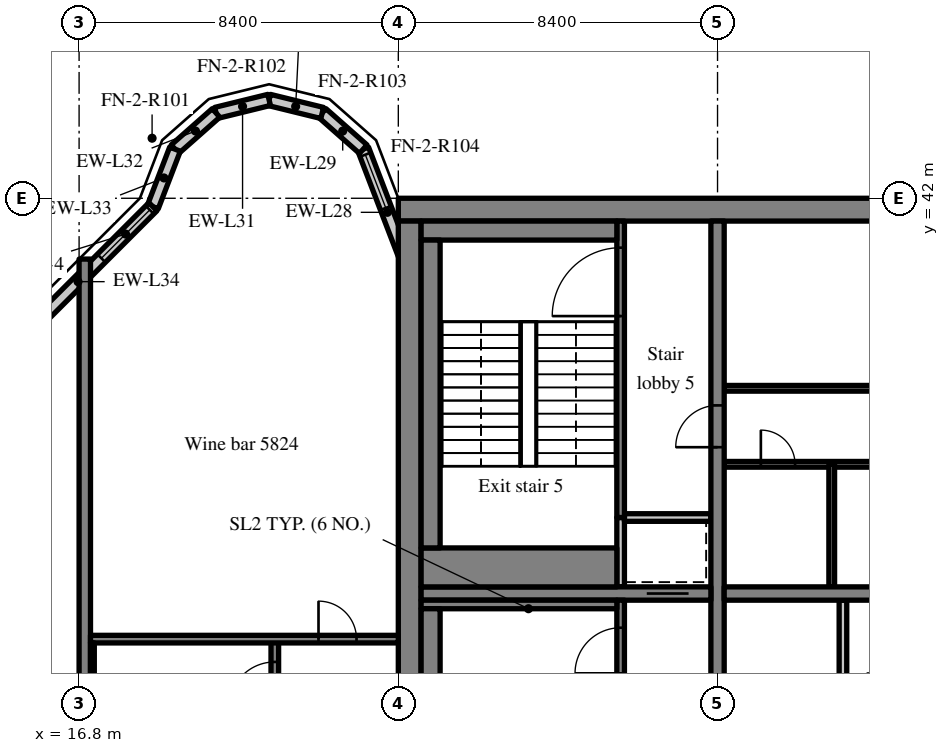
"""IFC4 building model, lengths in metres.
Left out: names, types, materials, properties, quantities, classifications, styles, units other than length and angle.
Written with IfcOpenShell. Run it as: python <this file> out.ifc"""

import sys

from ifc_helpers import new_model, si_unit, direction, frame, frame_2d, origin, place, context, subcontext, project, spatial, rectangle, extrude, source, transform, mapped, element, fill, save


model = new_model("IFC4")
c1 = context("Model", 3, precision=1e-05, world=origin(), true_north=direction((0.0, 1.0)))
c2 = subcontext(c1, "Body", "Model", "MODEL_VIEW")
j1 = project(units=[si_unit("LENGTHUNIT", "METRE"), si_unit("PLANEANGLEUNIT", "RADIAN")], contexts=[c1])
p1 = place(None, origin())
s1 = spatial("IfcSite", under=j1, at=p1, CompositionType="ELEMENT")
p2 = place(p1, origin())
s2 = spatial("IfcBuilding", under=s1, at=p2, CompositionType="ELEMENT")
p3 = place(p2, frame((0.0, 0.0, 241.3)))
s3 = spatial("IfcBuildingStorey", under=s2, at=p3, CompositionType="ELEMENT", Elevation=241.3)
m1 = source(origin(), c2, "Body", "SweptSolid", [
    extrude(rectangle(XDim=50.4, YDim=0.6, at=frame_2d((25.2, 0.0))), origin(), (0.0, 0.0, 1.0), 3.62),
])
p4 = place(p3, frame((25.2, 41.7, 0.0), z_axis=(0.0, 0.0, 1.0), x_axis=(1.0, 0.0, 0.0)))
e1 = element("IfcWall", 1, at=p4, inside=s3, PredefinedType="SHEAR", context=c2, shape_type="MappedRepresentation", body=[
    mapped(m1, transform((0.0, 0.0, 0.0), scale=1.0)),
])
m2 = source(origin(), c2, "Body", "SweptSolid", [
    extrude(rectangle(XDim=18.8, YDim=0.6, at=frame_2d((9.4, 0.0))), origin(), (0.0, 0.0, 1.0), 3.62),
])
p5 = place(p3, frame((25.5, 22.6, 0.0), z_axis=(0.0, 0.0, 1.0), x_axis=(0.0, 1.0, 0.0)))
e2 = element("IfcWall", 2, at=p5, inside=s3, PredefinedType="SHEAR", context=c2, shape_type="MappedRepresentation", body=[
    mapped(m2, transform((0.0, 0.0, 0.0), scale=1.0)),
])
m3 = source(origin(), c2, "Body", "SweptSolid", [
    extrude(rectangle(XDim=18.8, YDim=0.35, at=frame_2d((9.4, 0.0))), origin(), (0.0, 0.0, 1.0), 3.62),
])
p6 = place(p3, frame((33.6, 22.6, 0.0), z_axis=(0.0, 0.0, 1.0), x_axis=(0.0, 1.0, 0.0)))
e3 = element("IfcWall", 3, at=p6, inside=s3, PredefinedType="SHEAR", context=c2, shape_type="MappedRepresentation", body=[
    mapped(m3, transform((0.0, 0.0, 0.0), scale=1.0)),
])
m4 = source(origin(), c2, "Body", "SweptSolid", [
    extrude(rectangle(XDim=1.1, YDim=2.1, at=frame_2d((0.55, 1.05))), frame((0.0, 0.185, 0.0), z_axis=(0.0, -1.0, 0.0), x_axis=(1.0, 0.0, 0.0)), (0.0, 0.0, 1.0), 0.37),
])
p7 = place(p6, frame((12.85, 0.0, 0.0)))
e4 = element("IfcOpeningElement", 4, at=p7, cuts=e3, PredefinedType="OPENING", context=c2, shape_type="MappedRepresentation", body=[
    mapped(m4, transform((0.0, 0.0, 0.0), scale=1.0)),
])
m5 = source(origin(), c2, "Body", "SweptSolid", [
    extrude(rectangle(XDim=7.625, YDim=0.35, at=frame_2d((3.812, 0.0))), origin(), (0.0, 0.0, 1.0), 3.62),
])
p8 = place(p3, frame((25.8, 31.6, 0.0), z_axis=(0.0, 0.0, 1.0), x_axis=(1.0, 0.0, 0.0)))
e5 = element("IfcWall", 5, at=p8, inside=s3, PredefinedType="SHEAR", context=c2, shape_type="MappedRepresentation", body=[
    mapped(m5, transform((0.0, 0.0, 0.0), scale=1.0)),
])
p9 = place(p8, frame((5.938, 0.0, 0.0)))
e6 = element("IfcOpeningElement", 6, at=p9, cuts=e5, PredefinedType="OPENING", context=c2, shape_type="MappedRepresentation", body=[
    mapped(m4, transform((0.0, 0.0, 0.0), scale=1.0)),
])
m6 = source(origin(), c2, "Body", "SweptSolid", [
    extrude(rectangle(XDim=16.45, YDim=0.35, at=frame_2d((8.225, 0.0))), origin(), (0.0, 0.0, 1.0), 3.62),
])
p10 = place(p3, frame((33.775, 31.6, 0.0), z_axis=(0.0, 0.0, 1.0), x_axis=(1.0, 0.0, 0.0)))
e7 = element("IfcWall", 7, at=p10, inside=s3, PredefinedType="SHEAR", context=c2, shape_type="MappedRepresentation", body=[
    mapped(m6, transform((0.0, 0.0, 0.0), scale=1.0)),
])
m7 = source(origin(), c2, "Body", "SweptSolid", [
    extrude(rectangle(XDim=1.0, YDim=2.1, at=frame_2d((0.5, 1.05))), frame((0.0, 0.185, 0.0), z_axis=(0.0, -1.0, 0.0), x_axis=(1.0, 0.0, 0.0)), (0.0, 0.0, 1.0), 0.37),
])
p11 = place(p10, frame((14.837, 0.0, 0.0)))
e8 = element("IfcOpeningElement", 8, at=p11, cuts=e7, PredefinedType="OPENING", context=c2, shape_type="MappedRepresentation", body=[
    mapped(m7, transform((0.0, 0.0, 0.0), scale=1.0)),
])
m8 = source(origin(), c2, "Body", "SweptSolid", [
    extrude(rectangle(XDim=18.4, YDim=0.3, at=frame_2d((9.2, 0.0))), origin(), (0.0, 0.0, 1.0), 3.62),
])
p12 = place(p3, frame((16.95, 22.0, 0.0), z_axis=(0.0, 0.0, 1.0), x_axis=(0.0, 1.0, 0.0)))
e9 = element("IfcWall", 9, at=p12, inside=s3, PredefinedType="SHEAR", context=c2, shape_type="MappedRepresentation", body=[
    mapped(m8, transform((0.0, 0.0, 0.0), scale=1.0)),
])
m9 = source(origin(), c2, "Body", "SweptSolid", [
    extrude(rectangle(XDim=3.559, YDim=0.3, at=frame_2d((1.78, 0.0))), origin(), (0.0, 0.0, 1.0), 3.62),
])
p13 = place(p3, frame((25.55, 39.969, 0.0), z_axis=(0.0, 0.0, 1.0), x_axis=(-0.35779745313, 0.933799219604, 0.0)))
e10 = element("IfcWall", 10, at=p13, inside=s3, PredefinedType="SOLIDWALL", context=c2, shape_type="MappedRepresentation", body=[
    mapped(m9, transform((0.0, 0.0, 0.0), scale=1.0)),
])
m10 = source(origin(), c2, "Body", "SweptSolid", [
    extrude(rectangle(XDim=1.5, YDim=2.0, at=frame_2d((0.75, 1.0))), frame((0.0, 0.16, 0.0), z_axis=(0.0, -1.0, 0.0), x_axis=(1.0, 0.0, 0.0)), (0.0, 0.0, 1.0), 0.32),
])
p14 = place(p13, frame((1.903, 0.0, 0.9)))
e11 = element("IfcOpeningElement", 11, at=p14, cuts=e10, PredefinedType="OPENING", context=c2, shape_type="MappedRepresentation", body=[
    mapped(m10, transform((0.0, 0.0, 0.0), scale=1.0)),
])
m11 = source(origin(), c2, "Body", "SweptSolid", [
    extrude(rectangle(XDim=1.44, YDim=0.3, at=frame_2d((0.72, 0.0))), origin(), (0.0, 0.0, 1.0), 3.62),
])
p15 = place(p3, frame((24.277, 43.292, 0.0), z_axis=(0.0, 0.0, 1.0), x_axis=(-0.749649827867, 0.661834673902, 0.0)))
e12 = element("IfcWall", 12, at=p15, inside=s3, PredefinedType="SOLIDWALL", context=c2, shape_type="MappedRepresentation", body=[
    mapped(m11, transform((0.0, 0.0, 0.0), scale=1.0)),
])
m12 = source(origin(), c2, "Body", "SweptSolid", [
    extrude(rectangle(XDim=1.438, YDim=0.3, at=frame_2d((0.719, 0.0))), origin(), (0.0, 0.0, 1.0), 3.62),
])
p16 = place(p3, frame((23.197, 44.245, 0.0), z_axis=(0.0, 0.0, 1.0), x_axis=(-0.971152283879, 0.238460146601, 0.0)))
e13 = element("IfcWall", 13, at=p16, inside=s3, PredefinedType="SOLIDWALL", context=c2, shape_type="MappedRepresentation", body=[
    mapped(m12, transform((0.0, 0.0, 0.0), scale=1.0)),
])
m13 = source(origin(), c2, "Body", "SweptSolid", [
    extrude(rectangle(XDim=1.439, YDim=0.3, at=frame_2d((0.719, 0.0))), origin(), (0.0, 0.0, 1.0), 3.62),
])
p17 = place(p3, frame((21.8, 44.588, 0.0), z_axis=(0.0, 0.0, 1.0), x_axis=(-0.971161932466, -0.238420848351, 0.0)))
e14 = element("IfcWall", 14, at=p17, inside=s3, PredefinedType="SOLIDWALL", context=c2, shape_type="MappedRepresentation", body=[
    mapped(m13, transform((0.0, 0.0, 0.0), scale=1.0)),
])
m14 = source(origin(), c2, "Body", "SweptSolid", [
    extrude(rectangle(XDim=1.44, YDim=0.3, at=frame_2d((0.72, 0.0))), origin(), (0.0, 0.0, 1.0), 3.62),
])
p18 = place(p3, frame((20.403, 44.245, 0.0), z_axis=(0.0, 0.0, 1.0), x_axis=(-0.74957555648, -0.661918790432, 0.0)))
e15 = element("IfcWall", 15, at=p18, inside=s3, PredefinedType="SOLIDWALL", context=c2, shape_type="MappedRepresentation", body=[
    mapped(m14, transform((0.0, 0.0, 0.0), scale=1.0)),
])
m15 = source(origin(), c2, "Body", "SweptSolid", [
    extrude(rectangle(XDim=1.622, YDim=0.3, at=frame_2d((0.811, 0.0))), origin(), (0.0, 0.0, 1.0), 3.62),
])
p19 = place(p3, frame((19.323, 43.292, 0.0), z_axis=(0.0, 0.0, 1.0), x_axis=(-0.357778527068, -0.933806471154, 0.0)))
e16 = element("IfcWall", 16, at=p19, inside=s3, PredefinedType="SOLIDWALL", context=c2, shape_type="MappedRepresentation", body=[
    mapped(m15, transform((0.0, 0.0, 0.0), scale=1.0)),
])
m16 = source(origin(), c2, "Body", "SweptSolid", [
    extrude(rectangle(XDim=5.576, YDim=0.3, at=frame_2d((2.788, 0.0))), origin(), (0.0, 0.0, 1.0), 3.62),
])
p20 = place(p3, frame((18.743, 41.777, 0.0), z_axis=(0.0, 0.0, 1.0), x_axis=(-0.707106781187, -0.707106781187, 0.0)))
e17 = element("IfcWall", 17, at=p20, inside=s3, PredefinedType="SOLIDWALL", context=c2, shape_type="MappedRepresentation", body=[
    mapped(m16, transform((0.0, 0.0, 0.0), scale=1.0)),
])
m17 = source(origin(), c2, "Body", "SweptSolid", [
    extrude(rectangle(XDim=1.8, YDim=1.5, at=frame_2d((0.9, 0.75))), frame((0.0, 0.16, 0.0), z_axis=(0.0, -1.0, 0.0), x_axis=(1.0, 0.0, 0.0)), (0.0, 0.0, 1.0), 0.32),
])
p21 = place(p20, frame((0.118, 0.0, 0.9)))
e18 = element("IfcOpeningElement", 18, at=p21, cuts=e17, PredefinedType="OPENING", context=c2, shape_type="MappedRepresentation", body=[
    mapped(m17, transform((0.0, 0.0, 0.0), scale=1.0)),
])
m18 = source(origin(), c2, "Body", "SweptSolid", [
    extrude(rectangle(XDim=8.825, YDim=0.2, at=frame_2d((4.413, 0.0))), origin(), (0.0, 0.0, 1.0), 3.62),
])
p22 = place(p3, frame((36.9, 22.6, 0.0), z_axis=(0.0, 0.0, 1.0), x_axis=(0.0, 1.0, 0.0)))
e19 = element("IfcWall", 19, at=p22, inside=s3, PredefinedType="PARTITIONING", context=c2, shape_type="MappedRepresentation", body=[
    mapped(m18, transform((0.0, 0.0, 0.0), scale=1.0)),
])
m19 = source(origin(), c2, "Body", "SweptSolid", [
    extrude(rectangle(XDim=14.225, YDim=0.15, at=frame_2d((7.113, 0.0))), origin(), (0.0, 0.0, 1.0), 3.62),
])
p23 = place(p3, frame((33.775, 35.0, 0.0), z_axis=(0.0, 0.0, 1.0), x_axis=(1.0, 0.0, 0.0)))
e20 = element("IfcWall", 20, at=p23, inside=s3, PredefinedType="PARTITIONING", context=c2, shape_type="MappedRepresentation", body=[
    mapped(m19, transform((0.0, 0.0, 0.0), scale=1.0)),
])
m20 = source(origin(), c2, "Body", "SweptSolid", [
    extrude(rectangle(XDim=0.9, YDim=2.1, at=frame_2d((0.45, 1.05))), frame((0.0, 0.085, 0.0), z_axis=(0.0, -1.0, 0.0), x_axis=(1.0, 0.0, 0.0)), (0.0, 0.0, 1.0), 0.17),
])
p24 = place(p23, frame((0.965, 0.0, 0.0)))
e21 = element("IfcOpeningElement", 21, at=p24, cuts=e20, PredefinedType="OPENING", context=c2, shape_type="MappedRepresentation", body=[
    mapped(m20, transform((0.0, 0.0, 0.0), scale=1.0)),
])
p25 = place(p23, frame((5.917, 0.0, 0.0)))
e22 = element("IfcOpeningElement", 22, at=p25, cuts=e20, PredefinedType="OPENING", context=c2, shape_type="MappedRepresentation", body=[
    mapped(m20, transform((0.0, 0.0, 0.0), scale=1.0)),
])
p26 = place(p23, frame((11.577, 0.0, 0.0)))
e23 = element("IfcOpeningElement", 23, at=p26, cuts=e20, PredefinedType="OPENING", context=c2, shape_type="MappedRepresentation", body=[
    mapped(m20, transform((0.0, 0.0, 0.0), scale=1.0)),
])
m21 = source(origin(), c2, "Body", "SweptSolid", [
    extrude(rectangle(XDim=16.45, YDim=0.15, at=frame_2d((8.225, 0.0))), origin(), (0.0, 0.0, 1.0), 3.62),
])
p27 = place(p3, frame((33.775, 37.0, 0.0), z_axis=(0.0, 0.0, 1.0), x_axis=(1.0, 0.0, 0.0)))
e24 = element("IfcWall", 24, at=p27, inside=s3, PredefinedType="PARTITIONING", context=c2, shape_type="MappedRepresentation", body=[
    mapped(m21, transform((0.0, 0.0, 0.0), scale=1.0)),
])
p28 = place(p27, frame((6.541, 0.0, 0.0)))
e25 = element("IfcOpeningElement", 25, at=p28, cuts=e24, PredefinedType="OPENING", context=c2, shape_type="MappedRepresentation", body=[
    mapped(m20, transform((0.0, 0.0, 0.0), scale=1.0)),
])
p29 = place(p27, frame((14.766, 0.0, 0.0)))
e26 = element("IfcOpeningElement", 26, at=p29, cuts=e24, PredefinedType="OPENING", context=c2, shape_type="MappedRepresentation", body=[
    mapped(m20, transform((0.0, 0.0, 0.0), scale=1.0)),
])
m22 = source(origin(), c2, "Body", "SweptSolid", [
    extrude(rectangle(XDim=3.225, YDim=0.15, at=frame_2d((1.613, 0.0))), origin(), (0.0, 0.0, 1.0), 3.62),
])
p30 = place(p3, frame((36.605, 31.775, 0.0), z_axis=(0.0, 0.0, 1.0), x_axis=(0.0, 1.0, 0.0)))
e27 = element("IfcWall", 27, at=p30, inside=s3, PredefinedType="PARTITIONING", context=c2, shape_type="MappedRepresentation", body=[
    mapped(m22, transform((0.0, 0.0, 0.0), scale=1.0)),
])
m23 = source(origin(), c2, "Body", "SweptSolid", [
    extrude(rectangle(XDim=8.825, YDim=0.2, at=frame_2d((4.413, 0.0))), origin(), (0.0, 0.0, 1.0), 3.62),
])
p31 = place(p3, frame((31.05, 22.6, 0.0), z_axis=(0.0, 0.0, 1.0), x_axis=(0.0, 1.0, 0.0)))
e28 = element("IfcWall", 28, at=p31, inside=s3, PredefinedType="SOLIDWALL", context=c2, shape_type="MappedRepresentation", body=[
    mapped(m23, transform((0.0, 0.0, 0.0), scale=1.0)),
])
m24 = source(origin(), c2, "Body", "SweptSolid", [
    extrude(rectangle(XDim=1.2, YDim=2.1, at=frame_2d((0.6, 1.05))), frame((0.0, 0.11, 0.0), z_axis=(0.0, -1.0, 0.0), x_axis=(1.0, 0.0, 0.0)), (0.0, 0.0, 1.0), 0.22),
])
p32 = place(p31, frame((6.9, 0.0, 0.0)))
e29 = element("IfcOpeningElement", 29, at=p32, cuts=e28, PredefinedType="OPENING", context=c2, shape_type="MappedRepresentation", body=[
    mapped(m24, transform((0.0, 0.0, 0.0), scale=1.0)),
])
m25 = source(origin(), c2, "Body", "SweptSolid", [
    extrude(rectangle(XDim=1.825, YDim=0.2, at=frame_2d((0.913, 0.0))), origin(), (0.0, 0.0, 1.0), 3.62),
])
p33 = place(p3, frame((31.05, 31.775, 0.0), z_axis=(0.0, 0.0, 1.0), x_axis=(0.0, 1.0, 0.0)))
e30 = element("IfcWall", 30, at=p33, inside=s3, PredefinedType="SOLIDWALL", context=c2, shape_type="MappedRepresentation", body=[
    mapped(m25, transform((0.0, 0.0, 0.0), scale=1.0)),
])
m26 = source(origin(), c2, "Body", "SweptSolid", [
    extrude(rectangle(XDim=2.275, YDim=0.2, at=frame_2d((1.138, 0.0))), origin(), (0.0, 0.0, 1.0), 3.62),
])
p34 = place(p3, frame((31.15, 33.6, 0.0), z_axis=(0.0, 0.0, 1.0), x_axis=(1.0, 0.0, 0.0)))
e31 = element("IfcWall", 31, at=p34, inside=s3, PredefinedType="SOLIDWALL", context=c2, shape_type="MappedRepresentation", body=[
    mapped(m26, transform((0.0, 0.0, 0.0), scale=1.0)),
])
m27 = source(origin(), c2, "Body", "SweptSolid", [
    extrude(rectangle(XDim=7.8, YDim=0.2, at=frame_2d((3.9, 0.0))), origin(), (0.0, 0.0, 1.0), 3.62),
])
p35 = place(p3, frame((31.05, 33.6, 0.0), z_axis=(0.0, 0.0, 1.0), x_axis=(0.0, 1.0, 0.0)))
e32 = element("IfcWall", 32, at=p35, inside=s3, PredefinedType="SOLIDWALL", context=c2, shape_type="MappedRepresentation", body=[
    mapped(m27, transform((0.0, 0.0, 0.0), scale=1.0)),
])
m28 = source(origin(), c2, "Body", "SweptSolid", [
    extrude(rectangle(XDim=1.8, YDim=2.1, at=frame_2d((0.9, 1.05))), frame((0.0, 0.11, 0.0), z_axis=(0.0, -1.0, 0.0), x_axis=(1.0, 0.0, 0.0)), (0.0, 0.0, 1.0), 0.22),
])
p36 = place(p35, frame((5.3, 0.0, 0.0)))
e33 = element("IfcOpeningElement", 33, at=p36, cuts=e32, PredefinedType="OPENING", context=c2, shape_type="MappedRepresentation", body=[
    mapped(m28, transform((0.0, 0.0, 0.0), scale=1.0)),
])
m29 = source(origin(), c2, "Body", "SweptSolid", [
    extrude(rectangle(XDim=8.3, YDim=0.2, at=frame_2d((4.15, 0.0))), origin(), (0.0, 0.0, 1.0), 3.62),
])
p37 = place(p3, frame((21.95, 22.1, 0.0), z_axis=(0.0, 0.0, 1.0), x_axis=(0.0, 1.0, 0.0)))
e34 = element("IfcWall", 34, at=p37, inside=s3, PredefinedType="SOLIDWALL", context=c2, shape_type="MappedRepresentation", body=[
    mapped(m29, transform((0.0, 0.0, 0.0), scale=1.0)),
])
p38 = place(p37, frame((6.5, 0.0, 0.0)))
e35 = element("IfcOpeningElement", 35, at=p38, cuts=e34, PredefinedType="OPENING", context=c2, shape_type="MappedRepresentation", body=[
    mapped(m24, transform((0.0, 0.0, 0.0), scale=1.0)),
])
m30 = source(origin(), c2, "Body", "SweptSolid", [
    extrude(rectangle(XDim=8.1, YDim=0.2, at=frame_2d((4.05, 0.0))), origin(), (0.0, 0.0, 1.0), 3.62),
])
p39 = place(p3, frame((17.1, 30.4, 0.0), z_axis=(0.0, 0.0, 1.0), x_axis=(1.0, 0.0, 0.0)))
e36 = element("IfcWall", 36, at=p39, inside=s3, PredefinedType="SOLIDWALL", context=c2, shape_type="MappedRepresentation", body=[
    mapped(m30, transform((0.0, 0.0, 0.0), scale=1.0)),
])
m31 = source(origin(), c2, "Body", "SweptSolid", [
    extrude(rectangle(XDim=1.0, YDim=2.1, at=frame_2d((0.5, 1.05))), frame((0.0, 0.11, 0.0), z_axis=(0.0, -1.0, 0.0), x_axis=(1.0, 0.0, 0.0)), (0.0, 0.0, 1.0), 0.22),
])
p40 = place(p39, frame((6.0, 0.0, 0.0)))
e37 = element("IfcOpeningElement", 37, at=p40, cuts=e36, PredefinedType="OPENING", context=c2, shape_type="MappedRepresentation", body=[
    mapped(m31, transform((0.0, 0.0, 0.0), scale=1.0)),
])
m32 = source(origin(), c2, "Body", "SweptSolid", [
    extrude(rectangle(XDim=5.15, YDim=0.225, at=frame_2d((2.575, 0.0))), origin(), (0.0, 0.0, 1.0), 3.62),
])
p41 = place(p3, frame((25.8, 31.312, 0.0), z_axis=(0.0, 0.0, 1.0), x_axis=(1.0, 0.0, 0.0)))
e38 = element("IfcWall", 38, at=p41, inside=s3, PredefinedType="SOLIDWALL", context=c2, shape_type="MappedRepresentation", body=[
    mapped(m32, transform((0.0, 0.0, 0.0), scale=1.0)),
])
m33 = source(origin(), c2, "Body", "SweptSolid", [
    extrude(rectangle(XDim=8.1, YDim=0.5, at=frame_2d((4.05, 0.0))), origin(), (0.0, 0.0, 1.0), 3.62),
])
p42 = place(p3, frame((26.05, 23.1, 0.0), z_axis=(0.0, 0.0, 1.0), x_axis=(0.0, 1.0, 0.0)))
e39 = element("IfcWall", 39, at=p42, inside=s3, PredefinedType="SOLIDWALL", context=c2, shape_type="MappedRepresentation", body=[
    mapped(m33, transform((0.0, 0.0, 0.0), scale=1.0)),
])
m34 = source(origin(), c2, "Body", "SweptSolid", [
    extrude(rectangle(XDim=8.1, YDim=0.1, at=frame_2d((4.05, 0.0))), origin(), (0.0, 0.0, 1.0), 3.62),
])
p43 = place(p3, frame((17.15, 22.2, 0.0), z_axis=(0.0, 0.0, 1.0), x_axis=(0.0, 1.0, 0.0)))
e40 = element("IfcWall", 40, at=p43, inside=s3, PredefinedType="SOLIDWALL", context=c2, shape_type="MappedRepresentation", body=[
    mapped(m34, transform((0.0, 0.0, 0.0), scale=1.0)),
])
m35 = source(origin(), c2, "Body", "SweptSolid", [
    extrude(rectangle(XDim=5.15, YDim=0.5, at=frame_2d((2.575, 0.0))), origin(), (0.0, 0.0, 1.0), 3.62),
])
p44 = place(p3, frame((25.8, 41.15, 0.0), z_axis=(0.0, 0.0, 1.0), x_axis=(1.0, 0.0, 0.0)))
e41 = element("IfcWall", 41, at=p44, inside=s3, PredefinedType="SOLIDWALL", context=c2, shape_type="MappedRepresentation", body=[
    mapped(m35, transform((0.0, 0.0, 0.0), scale=1.0)),
])
m36 = source(origin(), c2, "Body", "SweptSolid", [
    extrude(rectangle(XDim=5.15, YDim=1.025, at=frame_2d((2.575, 0.0))), origin(), (0.0, 0.0, 1.0), 3.62),
])
p45 = place(p3, frame((25.8, 32.287, 0.0), z_axis=(0.0, 0.0, 1.0), x_axis=(1.0, 0.0, 0.0)))
e42 = element("IfcWall", 42, at=p45, inside=s3, PredefinedType="SOLIDWALL", context=c2, shape_type="MappedRepresentation", body=[
    mapped(m36, transform((0.0, 0.0, 0.0), scale=1.0)),
])
p46 = place(p3, frame((26.05, 32.8, 0.0), z_axis=(0.0, 0.0, 1.0), x_axis=(0.0, 1.0, 0.0)))
e43 = element("IfcWall", 43, at=p46, inside=s3, PredefinedType="SOLIDWALL", context=c2, shape_type="MappedRepresentation", body=[
    mapped(m33, transform((0.0, 0.0, 0.0), scale=1.0)),
])
m37 = source(origin(), c2, "Body", "SweptSolid", [
    extrude(rectangle(XDim=1.5, YDim=2.0, at=frame_2d((0.75, 1.0))), frame((0.0, 0.03, 0.0), z_axis=(0.0, -1.0, 0.0), x_axis=(1.0, 0.0, 0.0)), (0.0, 0.0, 1.0), 0.06),
])
p47 = place(p14, origin())
e44 = element("IfcWindow", 44, at=p47, inside=s3, PartitioningType="SINGLE_PANEL", PredefinedType="WINDOW", context=c2, shape_type="MappedRepresentation", body=[
    mapped(m37, transform((0.0, 0.0, 0.0), scale=1.0)),
])
fill(e11, e44)
m38 = source(origin(), c2, "Body", "SweptSolid", [
    extrude(rectangle(XDim=1.8, YDim=1.5, at=frame_2d((0.9, 0.75))), frame((0.0, 0.03, 0.0), z_axis=(0.0, -1.0, 0.0), x_axis=(1.0, 0.0, 0.0)), (0.0, 0.0, 1.0), 0.06),
])
p48 = place(p21, origin())
e45 = element("IfcWindow", 45, at=p48, inside=s3, PartitioningType="SINGLE_PANEL", PredefinedType="WINDOW", context=c2, shape_type="MappedRepresentation", body=[
    mapped(m38, transform((0.0, 0.0, 0.0), scale=1.0)),
])
fill(e18, e45)
m39 = source(origin(), c2, "Body", "SweptSolid", [
    extrude(rectangle(XDim=0.9, YDim=2.1, at=frame_2d((0.45, 1.05))), frame((0.0, 0.025, 0.0), z_axis=(0.0, -1.0, 0.0), x_axis=(1.0, 0.0, 0.0)), (0.0, 0.0, 1.0), 0.05),
])
p49 = place(p24, origin())
e46 = element("IfcDoor", 46, at=p49, inside=s3, OperationType="SINGLE_SWING_LEFT", PredefinedType="DOOR", context=c2, shape_type="MappedRepresentation", body=[
    mapped(m39, transform((0.0, 0.0, 0.0), scale=1.0)),
])
fill(e21, e46)
m40 = source(origin(), c2, "Body", "SweptSolid", [
    extrude(rectangle(XDim=1.2, YDim=2.1, at=frame_2d((0.6, 1.05))), frame((0.0, 0.025, 0.0), z_axis=(0.0, -1.0, 0.0), x_axis=(1.0, 0.0, 0.0)), (0.0, 0.0, 1.0), 0.05),
])
p50 = place(p32, origin())
e47 = element("IfcDoor", 47, at=p50, inside=s3, OperationType="SINGLE_SWING_LEFT", PredefinedType="DOOR", context=c2, shape_type="MappedRepresentation", body=[
    mapped(m40, transform((0.0, 0.0, 0.0), scale=1.0)),
])
fill(e29, e47)
m41 = source(origin(), c2, "Body", "SweptSolid", [
    extrude(rectangle(XDim=1.1, YDim=2.1, at=frame_2d((0.55, 1.05))), frame((0.0, 0.025, 0.0), z_axis=(0.0, -1.0, 0.0), x_axis=(1.0, 0.0, 0.0)), (0.0, 0.0, 1.0), 0.05),
])
p51 = place(p9, origin())
e48 = element("IfcDoor", 48, at=p51, inside=s3, OperationType="SLIDING_TO_RIGHT", PredefinedType="DOOR", context=c2, shape_type="MappedRepresentation", body=[
    mapped(m41, transform((0.0, 0.0, 0.0), scale=1.0)),
])
fill(e6, e48)
m42 = source(origin(), c2, "Body", "SweptSolid", [
    extrude(rectangle(XDim=1.8, YDim=2.1, at=frame_2d((0.9, 1.05))), frame((0.0, 0.025, 0.0), z_axis=(0.0, -1.0, 0.0), x_axis=(1.0, 0.0, 0.0)), (0.0, 0.0, 1.0), 0.05),
])
p52 = place(p36, origin())
e49 = element("IfcDoor", 49, at=p52, inside=s3, OperationType="SINGLE_SWING_LEFT", PredefinedType="DOOR", context=c2, shape_type="MappedRepresentation", body=[
    mapped(m42, transform((0.0, 0.0, 0.0), scale=1.0)),
])
fill(e33, e49)
p53 = place(p38, origin())
e50 = element("IfcDoor", 50, at=p53, inside=s3, OperationType="SINGLE_SWING_LEFT", PredefinedType="DOOR", context=c2, shape_type="MappedRepresentation", body=[
    mapped(m40, transform((0.0, 0.0, 0.0), scale=1.0)),
])
fill(e35, e50)
m43 = source(origin(), c2, "Body", "SweptSolid", [
    extrude(rectangle(XDim=1.0, YDim=2.1, at=frame_2d((0.5, 1.05))), frame((0.0, 0.025, 0.0), z_axis=(0.0, -1.0, 0.0), x_axis=(1.0, 0.0, 0.0)), (0.0, 0.0, 1.0), 0.05),
])
p54 = place(p40, origin())
e51 = element("IfcDoor", 51, at=p54, inside=s3, OperationType="SINGLE_SWING_LEFT", PredefinedType="DOOR", context=c2, shape_type="MappedRepresentation", body=[
    mapped(m43, transform((0.0, 0.0, 0.0), scale=1.0)),
])
fill(e37, e51)
p55 = place(p7, origin())
e52 = element("IfcDoor", 52, at=p55, inside=s3, OperationType="SINGLE_SWING_LEFT", PredefinedType="DOOR", context=c2, shape_type="MappedRepresentation", body=[
    mapped(m41, transform((0.0, 0.0, 0.0), scale=1.0)),
])
fill(e4, e52)
save(model, sys.argv[1])
